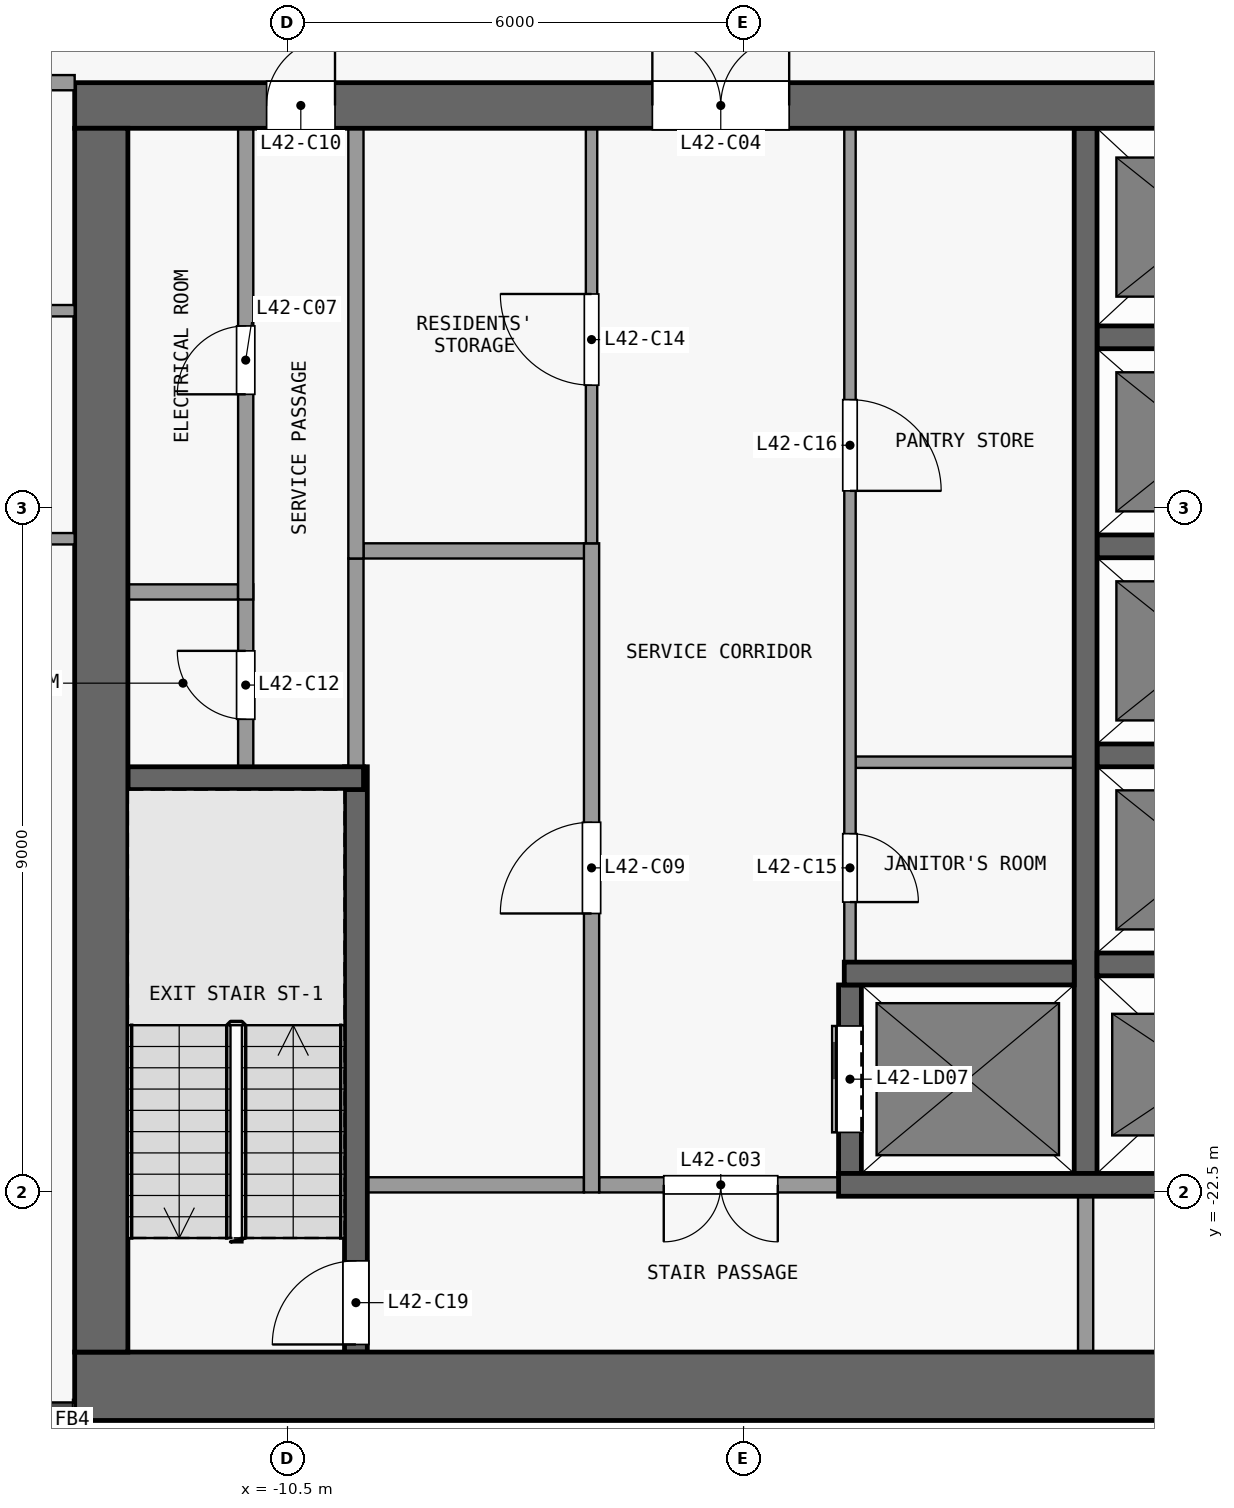
"""IFC4 building model, lengths in metres.
Left out: names, types, materials, properties, quantities, classifications, styles, units other than length and angle.
Written with IfcOpenShell. Run it as: python <this file> out.ifc"""

import sys

from ifc_helpers import new_model, si_unit, direction, frame, frame_2d, origin, place, context, subcontext, project, spatial, rectangle, extrude, element, fill, save


model = new_model("IFC4")
c1 = context("Model", 3, precision=1e-05, world=origin(), true_north=direction((0.0, 1.0)))
c2 = subcontext(c1, "Body", "Model", "MODEL_VIEW")
j1 = project(units=[si_unit("LENGTHUNIT", "METRE"), si_unit("PLANEANGLEUNIT", "RADIAN")], contexts=[c1])
p1 = place(None, origin())
s1 = spatial("IfcSite", under=j1, at=p1, CompositionType="ELEMENT")
p2 = place(p1, origin())
s2 = spatial("IfcBuilding", under=s1, at=p2, CompositionType="ELEMENT")
p3 = place(p2, frame((0.0, 0.0, 170.9)))
s3 = spatial("IfcBuildingStorey", under=s2, at=p3, CompositionType="ELEMENT", Elevation=170.9)
p4 = place(p3, frame((-13.3, -25.05, 0.0), z_axis=(0.0, 0.0, 1.0), x_axis=(1.0, 0.0, 0.0)))
e1 = element("IfcWall", 1, at=p4, inside=s3, PredefinedType="SHEAR", context=c2, shape_type="SweptSolid", body=[
    extrude(rectangle(XDim=26.6, YDim=0.9, at=frame_2d((13.3, 0.0))), origin(), (0.0, 0.0, 1.0), 3.3),
])
p5 = place(p3, frame((-13.3, -8.2, 0.0), z_axis=(0.0, 0.0, 1.0), x_axis=(1.0, 0.0, 0.0)))
e2 = element("IfcWall", 2, at=p5, inside=s3, PredefinedType="SHEAR", context=c2, shape_type="SweptSolid", body=[
    extrude(rectangle(XDim=26.6, YDim=0.6, at=frame_2d((13.3, 0.0))), origin(), (0.0, 0.0, 1.0), 3.3),
])
p6 = place(p5, frame((7.6, 0.0, 0.0)))
e3 = element("IfcOpeningElement", 3, at=p6, cuts=e2, PredefinedType="OPENING", context=c2, shape_type="SweptSolid", body=[
    extrude(rectangle(XDim=1.8, YDim=2.1, at=frame_2d((0.9, 1.05))), frame((0.0, 0.31, 0.0), z_axis=(0.0, -1.0, 0.0), x_axis=(1.0, 0.0, 0.0)), (0.0, 0.0, 1.0), 0.62),
])
p7 = place(p5, frame((17.2, 0.0, 0.0)))
e4 = element("IfcOpeningElement", 4, at=p7, cuts=e2, PredefinedType="OPENING", context=c2, shape_type="SweptSolid", body=[
    extrude(rectangle(XDim=1.8, YDim=2.1, at=frame_2d((0.9, 1.05))), frame((0.0, 0.31, 0.0), z_axis=(0.0, -1.0, 0.0), x_axis=(1.0, 0.0, 0.0)), (0.0, 0.0, 1.0), 0.62),
])
p8 = place(p5, frame((2.525, 0.0, 0.0)))
e5 = element("IfcOpeningElement", 5, at=p8, cuts=e2, PredefinedType="OPENING", context=c2, shape_type="SweptSolid", body=[
    extrude(rectangle(XDim=0.9, YDim=2.1, at=frame_2d((0.45, 1.05))), frame((0.0, 0.31, 0.0), z_axis=(0.0, -1.0, 0.0), x_axis=(1.0, 0.0, 0.0)), (0.0, 0.0, 1.0), 0.62),
])
p9 = place(p5, frame((23.175, 0.0, 0.0)))
e6 = element("IfcOpeningElement", 6, at=p9, cuts=e2, PredefinedType="OPENING", context=c2, shape_type="SweptSolid", body=[
    extrude(rectangle(XDim=0.9, YDim=2.1, at=frame_2d((0.45, 1.05))), frame((0.0, 0.31, 0.0), z_axis=(0.0, -1.0, 0.0), x_axis=(1.0, 0.0, 0.0)), (0.0, 0.0, 1.0), 0.62),
])
p10 = place(p3, frame((-12.95, -24.6, 0.0), z_axis=(0.0, 0.0, 1.0), x_axis=(0.0, 1.0, 0.0)))
e7 = element("IfcWall", 7, at=p10, inside=s3, PredefinedType="SHEAR", context=c2, shape_type="SweptSolid", body=[
    extrude(rectangle(XDim=16.1, YDim=0.7, at=frame_2d((8.05, 0.0))), origin(), (0.0, 0.0, 1.0), 3.3),
])
p11 = place(p3, frame((-9.45, -22.4, 0.0), z_axis=(0.0, 0.0, 1.0), x_axis=(1.0, 0.0, 0.0)))
e8 = element("IfcWall", 8, at=p11, inside=s3, PredefinedType="PARTITIONING", context=c2, shape_type="SweptSolid", body=[
    extrude(rectangle(XDim=2.85, YDim=0.2, at=frame_2d((1.425, 0.0))), origin(), (0.0, 0.0, 1.0), 3.3),
])
p12 = place(p3, frame((-3.25, -22.4, 0.0), z_axis=(0.0, 0.0, 1.0), x_axis=(-1.0, 0.0, 0.0)))
e9 = element("IfcWall", 9, at=p12, inside=s3, PredefinedType="PARTITIONING", context=c2, shape_type="SweptSolid", body=[
    extrude(rectangle(XDim=3.15, YDim=0.2, at=frame_2d((1.575, 0.0))), origin(), (0.0, 0.0, 1.0), 3.3),
])
p13 = place(p12, frame((0.8, 0.0, 0.0)))
e10 = element("IfcOpeningElement", 10, at=p13, cuts=e9, PredefinedType="OPENING", context=c2, shape_type="SweptSolid", body=[
    extrude(rectangle(XDim=1.5, YDim=2.1, at=frame_2d((0.75, 1.05))), frame((0.0, 0.11, 0.0), z_axis=(0.0, -1.0, 0.0), x_axis=(1.0, 0.0, 0.0)), (0.0, 0.0, 1.0), 0.22),
])
p14 = place(p3, frame((-3.25, -22.4, 0.0), z_axis=(0.0, 0.0, 1.0), x_axis=(1.0, 0.0, 0.0)))
e11 = element("IfcWall", 11, at=p14, inside=s3, PredefinedType="SHEAR", context=c2, shape_type="SweptSolid", body=[
    extrude(rectangle(XDim=6.2, YDim=0.3, at=frame_2d((3.1, 0.0))), origin(), (0.0, 0.0, 1.0), 3.3),
])
p15 = place(p3, frame((-3.175, -19.62, 0.0), z_axis=(0.0, 0.0, 1.0), x_axis=(1.0, 0.0, 0.0)))
e12 = element("IfcWall", 12, at=p15, inside=s3, PredefinedType="SHEAR", context=c2, shape_type="SweptSolid", body=[
    extrude(rectangle(XDim=3.025, YDim=0.3, at=frame_2d((1.513, 0.0))), origin(), (0.0, 0.0, 1.0), 3.3),
])
p16 = place(p3, frame((0.15, -19.5, 0.0), z_axis=(0.0, 0.0, 1.0), x_axis=(1.0, 0.0, 0.0)))
e13 = element("IfcWall", 13, at=p16, inside=s3, PredefinedType="SHEAR", context=c2, shape_type="SweptSolid", body=[
    extrude(rectangle(XDim=2.8, YDim=0.3, at=frame_2d((1.4, 0.0))), origin(), (0.0, 0.0, 1.0), 3.3),
])
p17 = place(p3, frame((-12.6, -17.05, 0.0), z_axis=(0.0, 0.0, 1.0), x_axis=(1.0, 0.0, 0.0)))
e14 = element("IfcWall", 14, at=p17, inside=s3, PredefinedType="SHEAR", context=c2, shape_type="SweptSolid", body=[
    extrude(rectangle(XDim=3.1, YDim=0.3, at=frame_2d((1.55, 0.0))), origin(), (0.0, 0.0, 1.0), 3.3),
])
p18 = place(p3, frame((-3.025, -16.84, 0.0), z_axis=(0.0, 0.0, 1.0), x_axis=(1.0, 0.0, 0.0)))
e15 = element("IfcWall", 15, at=p18, inside=s3, PredefinedType="PARTITIONING", context=c2, shape_type="SweptSolid", body=[
    extrude(rectangle(XDim=2.875, YDim=0.15, at=frame_2d((1.438, 0.0))), origin(), (0.0, 0.0, 1.0), 3.3),
])
p19 = place(p3, frame((0.15, -16.75, 0.0), z_axis=(0.0, 0.0, 1.0), x_axis=(1.0, 0.0, 0.0)))
e16 = element("IfcWall", 16, at=p19, inside=s3, PredefinedType="SHEAR", context=c2, shape_type="SweptSolid", body=[
    extrude(rectangle(XDim=2.8, YDim=0.3, at=frame_2d((1.4, 0.0))), origin(), (0.0, 0.0, 1.0), 3.3),
])
p20 = place(p3, frame((-12.6, -14.6, 0.0), z_axis=(0.0, 0.0, 1.0), x_axis=(1.0, 0.0, 0.0)))
e17 = element("IfcWall", 17, at=p20, inside=s3, PredefinedType="PARTITIONING", context=c2, shape_type="SweptSolid", body=[
    extrude(rectangle(XDim=1.45, YDim=0.2, at=frame_2d((0.725, 0.0))), origin(), (0.0, 0.0, 1.0), 3.3),
])
p21 = place(p3, frame((-9.5, -14.06, 0.0), z_axis=(0.0, 0.0, 1.0), x_axis=(1.0, 0.0, 0.0)))
e18 = element("IfcWall", 18, at=p21, inside=s3, PredefinedType="PARTITIONING", context=c2, shape_type="SweptSolid", body=[
    extrude(rectangle(XDim=3.075, YDim=0.2, at=frame_2d((1.538, 0.0))), origin(), (0.0, 0.0, 1.0), 3.3),
])
for number, where, z_axis, x_axis in (
    (19, (0.15, -14.0, 0.0), (0.0, 0.0, 1.0), (1.0, 0.0, 0.0)),
    (20, (0.15, -11.25, 0.0), (0.0, 0.0, 1.0), (1.0, 0.0, 0.0)),
):
    element("IfcWall", number, at=place(p3, frame(where, z_axis=z_axis, x_axis=x_axis)), inside=s3, PredefinedType="SHEAR", context=c2, shape_type="SweptSolid", body=[
        extrude(rectangle(XDim=2.8, YDim=0.3, at=frame_2d((1.4, 0.0))), origin(), (0.0, 0.0, 1.0), 3.3),
    ])
p22 = place(p3, frame((-11.05, -16.9, 0.0), z_axis=(0.0, 0.0, 1.0), x_axis=(0.0, 1.0, 0.0)))
e21 = element("IfcWall", 21, at=p22, inside=s3, PredefinedType="PARTITIONING", context=c2, shape_type="SweptSolid", body=[
    extrude(rectangle(XDim=2.4, YDim=0.2, at=frame_2d((1.2, 0.0))), origin(), (0.0, 0.0, 1.0), 3.3),
])
p23 = place(p22, frame((0.625, 0.0, 0.0)))
e22 = element("IfcOpeningElement", 22, at=p23, cuts=e21, PredefinedType="OPENING", context=c2, shape_type="SweptSolid", body=[
    extrude(rectangle(XDim=0.9, YDim=2.1, at=frame_2d((0.45, 1.05))), frame((0.0, 0.11, 0.0), z_axis=(0.0, -1.0, 0.0), x_axis=(1.0, 0.0, 0.0)), (0.0, 0.0, 1.0), 0.22),
])
p24 = place(p3, frame((-11.05, -14.7, 0.0), z_axis=(0.0, 0.0, 1.0), x_axis=(0.0, 1.0, 0.0)))
e23 = element("IfcWall", 23, at=p24, inside=s3, PredefinedType="PARTITIONING", context=c2, shape_type="SweptSolid", body=[
    extrude(rectangle(XDim=6.2, YDim=0.2, at=frame_2d((3.1, 0.0))), origin(), (0.0, 0.0, 1.0), 3.3),
])
p25 = place(p24, frame((2.7, 0.0, 0.0)))
e24 = element("IfcOpeningElement", 24, at=p25, cuts=e23, PredefinedType="OPENING", context=c2, shape_type="SweptSolid", body=[
    extrude(rectangle(XDim=0.9, YDim=2.1, at=frame_2d((0.45, 1.05))), frame((0.0, 0.11, 0.0), z_axis=(0.0, -1.0, 0.0), x_axis=(1.0, 0.0, 0.0)), (0.0, 0.0, 1.0), 0.22),
])
p26 = place(p3, frame((-9.6, -24.6, 0.0), z_axis=(0.0, 0.0, 1.0), x_axis=(0.0, 1.0, 0.0)))
e25 = element("IfcWall", 25, at=p26, inside=s3, PredefinedType="SHEAR", context=c2, shape_type="SweptSolid", body=[
    extrude(rectangle(XDim=7.7, YDim=0.3, at=frame_2d((3.85, 0.0))), origin(), (0.0, 0.0, 1.0), 3.3),
])
p27 = place(p26, frame((0.1, 0.0, 0.0)))
e26 = element("IfcOpeningElement", 26, at=p27, cuts=e25, PredefinedType="OPENING", context=c2, shape_type="SweptSolid", body=[
    extrude(rectangle(XDim=1.1, YDim=2.1, at=frame_2d((0.55, 1.05))), frame((0.0, 0.16, 0.0), z_axis=(0.0, -1.0, 0.0), x_axis=(1.0, 0.0, 0.0)), (0.0, 0.0, 1.0), 0.32),
])
p28 = place(p3, frame((-9.6, -16.9, 0.0), z_axis=(0.0, 0.0, 1.0), x_axis=(0.0, 1.0, 0.0)))
e27 = element("IfcWall", 27, at=p28, inside=s3, PredefinedType="PARTITIONING", context=c2, shape_type="SweptSolid", body=[
    extrude(rectangle(XDim=2.74, YDim=0.2, at=frame_2d((1.37, 0.0))), origin(), (0.0, 0.0, 1.0), 3.3),
])
p29 = place(p3, frame((-9.6, -14.16, 0.0), z_axis=(0.0, 0.0, 1.0), x_axis=(0.0, 1.0, 0.0)))
e28 = element("IfcWall", 28, at=p29, inside=s3, PredefinedType="PARTITIONING", context=c2, shape_type="SweptSolid", body=[
    extrude(rectangle(XDim=5.66, YDim=0.2, at=frame_2d((2.83, 0.0))), origin(), (0.0, 0.0, 1.0), 3.3),
])
p30 = place(p3, frame((-6.5, -22.5, 0.0), z_axis=(0.0, 0.0, 1.0), x_axis=(0.0, 1.0, 0.0)))
e29 = element("IfcWall", 29, at=p30, inside=s3, PredefinedType="PARTITIONING", context=c2, shape_type="SweptSolid", body=[
    extrude(rectangle(XDim=8.54, YDim=0.2, at=frame_2d((4.27, 0.0))), origin(), (0.0, 0.0, 1.0), 3.3),
])
p31 = place(p30, frame((3.67, 0.0, 0.0)))
e30 = element("IfcOpeningElement", 30, at=p31, cuts=e29, PredefinedType="OPENING", context=c2, shape_type="SweptSolid", body=[
    extrude(rectangle(XDim=1.2, YDim=2.1, at=frame_2d((0.6, 1.05))), frame((0.0, 0.11, 0.0), z_axis=(0.0, -1.0, 0.0), x_axis=(1.0, 0.0, 0.0)), (0.0, 0.0, 1.0), 0.22),
])
p32 = place(p3, frame((-6.5, -13.96, 0.0), z_axis=(0.0, 0.0, 1.0), x_axis=(0.0, 1.0, 0.0)))
e31 = element("IfcWall", 31, at=p32, inside=s3, PredefinedType="PARTITIONING", context=c2, shape_type="SweptSolid", body=[
    extrude(rectangle(XDim=5.46, YDim=0.15, at=frame_2d((2.73, 0.0))), origin(), (0.0, 0.0, 1.0), 3.3),
])
p33 = place(p32, frame((2.08, 0.0, 0.0)))
e32 = element("IfcOpeningElement", 32, at=p33, cuts=e31, PredefinedType="OPENING", context=c2, shape_type="SweptSolid", body=[
    extrude(rectangle(XDim=1.2, YDim=2.1, at=frame_2d((0.6, 1.05))), frame((0.0, 0.085, 0.0), z_axis=(0.0, -1.0, 0.0), x_axis=(1.0, 0.0, 0.0)), (0.0, 0.0, 1.0), 0.17),
])
p34 = place(p3, frame((-3.1, -22.25, 0.0), z_axis=(0.0, 0.0, 1.0), x_axis=(0.0, 1.0, 0.0)))
e33 = element("IfcWall", 33, at=p34, inside=s3, PredefinedType="SHEAR", context=c2, shape_type="SweptSolid", body=[
    extrude(rectangle(XDim=2.48, YDim=0.3, at=frame_2d((1.24, 0.0))), origin(), (0.0, 0.0, 1.0), 3.3),
])
p35 = place(p34, frame((0.54, 0.0, 0.0)))
e34 = element("IfcOpeningElement", 34, at=p35, cuts=e33, PredefinedType="OPENING", context=c2, shape_type="SweptSolid", body=[
    extrude(rectangle(XDim=1.4, YDim=2.1, at=frame_2d((0.7, 1.05))), frame((0.0, 0.16, 0.0), z_axis=(0.0, -1.0, 0.0), x_axis=(1.0, 0.0, 0.0)), (0.0, 0.0, 1.0), 0.32),
])
p36 = place(p3, frame((-3.1, -8.5, 0.0), z_axis=(0.0, 0.0, 1.0), x_axis=(0.0, -1.0, 0.0)))
e35 = element("IfcWall", 35, at=p36, inside=s3, PredefinedType="PARTITIONING", context=c2, shape_type="SweptSolid", body=[
    extrude(rectangle(XDim=10.97, YDim=0.15, at=frame_2d((5.485, 0.0))), origin(), (0.0, 0.0, 1.0), 3.3),
])
p37 = place(p36, frame((9.28, 0.0, 0.0)))
e36 = element("IfcOpeningElement", 36, at=p37, cuts=e35, PredefinedType="OPENING", context=c2, shape_type="SweptSolid", body=[
    extrude(rectangle(XDim=0.9, YDim=2.1, at=frame_2d((0.45, 1.05))), frame((0.0, 0.085, 0.0), z_axis=(0.0, -1.0, 0.0), x_axis=(1.0, 0.0, 0.0)), (0.0, 0.0, 1.0), 0.17),
])
p38 = place(p36, frame((3.57, 0.0, 0.0)))
e37 = element("IfcOpeningElement", 37, at=p38, cuts=e35, PredefinedType="OPENING", context=c2, shape_type="SweptSolid", body=[
    extrude(rectangle(XDim=1.2, YDim=2.1, at=frame_2d((0.6, 1.05))), frame((0.0, 0.085, 0.0), z_axis=(0.0, -1.0, 0.0), x_axis=(1.0, 0.0, 0.0)), (0.0, 0.0, 1.0), 0.17),
])
p39 = place(p3, frame((0.0, -24.6, 0.0), z_axis=(0.0, 0.0, 1.0), x_axis=(0.0, 1.0, 0.0)))
e38 = element("IfcWall", 38, at=p39, inside=s3, PredefinedType="PARTITIONING", context=c2, shape_type="SweptSolid", body=[
    extrude(rectangle(XDim=2.05, YDim=0.2, at=frame_2d((1.025, 0.0))), origin(), (0.0, 0.0, 1.0), 3.3),
])
p40 = place(p3, frame((0.0, -22.25, 0.0), z_axis=(0.0, 0.0, 1.0), x_axis=(0.0, 1.0, 0.0)))
e39 = element("IfcWall", 39, at=p40, inside=s3, PredefinedType="SHEAR", context=c2, shape_type="SweptSolid", body=[
    extrude(rectangle(XDim=13.75, YDim=0.3, at=frame_2d((6.875, 0.0))), origin(), (0.0, 0.0, 1.0), 3.3),
])
p41 = place(p3, frame((-19.262, -13.9, 0.0), z_axis=(0.0, 0.0, 1.0), x_axis=(1.0, 0.0, 0.0)))
e40 = element("IfcWall", 40, at=p41, inside=s3, PredefinedType="PARTITIONING", context=c2, shape_type="SweptSolid", body=[
    extrude(rectangle(XDim=5.962, YDim=0.15, at=frame_2d((2.981, 0.0))), origin(), (0.0, 0.0, 1.0), 3.3),
])
p42 = place(p41, frame((0.512, 0.0, 0.0)))
e41 = element("IfcOpeningElement", 41, at=p42, cuts=e40, PredefinedType="OPENING", context=c2, shape_type="SweptSolid", body=[
    extrude(rectangle(XDim=0.9, YDim=2.1, at=frame_2d((0.45, 1.05))), frame((0.0, 0.085, 0.0), z_axis=(0.0, -1.0, 0.0), x_axis=(1.0, 0.0, 0.0)), (0.0, 0.0, 1.0), 0.17),
])
p43 = place(p3, frame((-19.262, -10.9, 0.0), z_axis=(0.0, 0.0, 1.0), x_axis=(1.0, 0.0, 0.0)))
e42 = element("IfcWall", 42, at=p43, inside=s3, PredefinedType="PARTITIONING", context=c2, shape_type="SweptSolid", body=[
    extrude(rectangle(XDim=5.962, YDim=0.15, at=frame_2d((2.981, 0.0))), origin(), (0.0, 0.0, 1.0), 3.3),
])
p44 = place(p43, frame((1.012, 0.0, 0.0)))
e43 = element("IfcOpeningElement", 43, at=p44, cuts=e42, PredefinedType="OPENING", context=c2, shape_type="SweptSolid", body=[
    extrude(rectangle(XDim=0.9, YDim=2.1, at=frame_2d((0.45, 1.05))), frame((0.0, 0.085, 0.0), z_axis=(0.0, -1.0, 0.0), x_axis=(1.0, 0.0, 0.0)), (0.0, 0.0, 1.0), 0.17),
])
p45 = place(p43, frame((3.963, 0.0, 0.0)))
e44 = element("IfcOpeningElement", 44, at=p45, cuts=e42, PredefinedType="OPENING", context=c2, shape_type="SweptSolid", body=[
    extrude(rectangle(XDim=0.9, YDim=2.1, at=frame_2d((0.45, 1.05))), frame((0.0, 0.085, 0.0), z_axis=(0.0, -1.0, 0.0), x_axis=(1.0, 0.0, 0.0)), (0.0, 0.0, 1.0), 0.17),
])
p46 = place(p3, frame((-19.262, -7.9, 0.0), z_axis=(0.0, 0.0, 1.0), x_axis=(1.0, 0.0, 0.0)))
e45 = element("IfcWall", 45, at=p46, inside=s3, PredefinedType="PARTITIONING", context=c2, shape_type="SweptSolid", body=[
    extrude(rectangle(XDim=5.962, YDim=0.2, at=frame_2d((2.981, 0.0))), origin(), (0.0, 0.0, 1.0), 3.3),
])
p47 = place(p46, frame((2.412, 0.0, 0.0)))
e46 = element("IfcOpeningElement", 46, at=p47, cuts=e45, PredefinedType="OPENING", context=c2, shape_type="SweptSolid", body=[
    extrude(rectangle(XDim=1.0, YDim=2.1, at=frame_2d((0.5, 1.05))), frame((0.0, 0.11, 0.0), z_axis=(0.0, -1.0, 0.0), x_axis=(1.0, 0.0, 0.0)), (0.0, 0.0, 1.0), 0.22),
])
p48 = place(p35, origin())
e47 = element("IfcDoor", 47, at=p48, inside=s3, OperationType="DOUBLE_DOOR_SLIDING", PredefinedType="DOOR", context=c2, shape_type="SweptSolid", body=[
    extrude(rectangle(XDim=1.4, YDim=2.1, at=frame_2d((0.7, 1.05))), frame((0.0, 0.025, 0.0), z_axis=(0.0, -1.0, 0.0), x_axis=(1.0, 0.0, 0.0)), (0.0, 0.0, 1.0), 0.05),
])
fill(e34, e47)
p49 = place(p13, origin())
e48 = element("IfcDoor", 48, at=p49, inside=s3, OperationType="DOUBLE_DOOR_SINGLE_SWING", PredefinedType="DOOR", context=c2, shape_type="SweptSolid", body=[
    extrude(rectangle(XDim=1.5, YDim=2.1, at=frame_2d((0.75, 1.05))), frame((0.0, 0.025, 0.0), z_axis=(0.0, -1.0, 0.0), x_axis=(1.0, 0.0, 0.0)), (0.0, 0.0, 1.0), 0.05),
])
fill(e10, e48)
p50 = place(p6, origin())
e49 = element("IfcDoor", 49, at=p50, inside=s3, OperationType="DOUBLE_DOOR_SINGLE_SWING", PredefinedType="DOOR", context=c2, shape_type="SweptSolid", body=[
    extrude(rectangle(XDim=1.8, YDim=2.1, at=frame_2d((0.9, 1.05))), frame((0.0, 0.025, 0.0), z_axis=(0.0, -1.0, 0.0), x_axis=(1.0, 0.0, 0.0)), (0.0, 0.0, 1.0), 0.05),
])
fill(e3, e49)
p51 = place(p25, origin())
e50 = element("IfcDoor", 50, at=p51, inside=s3, OperationType="SINGLE_SWING_LEFT", PredefinedType="DOOR", context=c2, shape_type="SweptSolid", body=[
    extrude(rectangle(XDim=0.9, YDim=2.1, at=frame_2d((0.45, 1.05))), frame((0.0, 0.025, 0.0), z_axis=(0.0, -1.0, 0.0), x_axis=(1.0, 0.0, 0.0)), (0.0, 0.0, 1.0), 0.05),
])
fill(e24, e50)
p52 = place(p31, origin())
e51 = element("IfcDoor", 51, at=p52, inside=s3, OperationType="SINGLE_SWING_LEFT", PredefinedType="DOOR", context=c2, shape_type="SweptSolid", body=[
    extrude(rectangle(XDim=1.2, YDim=2.1, at=frame_2d((0.6, 1.05))), frame((0.0, 0.025, 0.0), z_axis=(0.0, -1.0, 0.0), x_axis=(1.0, 0.0, 0.0)), (0.0, 0.0, 1.0), 0.05),
])
fill(e30, e51)
p53 = place(p8, origin())
e52 = element("IfcDoor", 52, at=p53, inside=s3, OperationType="SINGLE_SWING_RIGHT", PredefinedType="DOOR", context=c2, shape_type="SweptSolid", body=[
    extrude(rectangle(XDim=0.9, YDim=2.1, at=frame_2d((0.45, 1.05))), frame((0.0, 0.025, 0.0), z_axis=(0.0, -1.0, 0.0), x_axis=(1.0, 0.0, 0.0)), (0.0, 0.0, 1.0), 0.05),
])
fill(e5, e52)
p54 = place(p23, origin())
e53 = element("IfcDoor", 53, at=p54, inside=s3, OperationType="SINGLE_SWING_RIGHT", PredefinedType="DOOR", context=c2, shape_type="SweptSolid", body=[
    extrude(rectangle(XDim=0.9, YDim=2.1, at=frame_2d((0.45, 1.05))), frame((0.0, 0.025, 0.0), z_axis=(0.0, -1.0, 0.0), x_axis=(1.0, 0.0, 0.0)), (0.0, 0.0, 1.0), 0.05),
])
fill(e22, e53)
p55 = place(p33, origin())
e54 = element("IfcDoor", 54, at=p55, inside=s3, OperationType="SINGLE_SWING_RIGHT", PredefinedType="DOOR", context=c2, shape_type="SweptSolid", body=[
    extrude(rectangle(XDim=1.2, YDim=2.1, at=frame_2d((0.6, 1.05))), frame((0.0, 0.025, 0.0), z_axis=(0.0, -1.0, 0.0), x_axis=(1.0, 0.0, 0.0)), (0.0, 0.0, 1.0), 0.05),
])
fill(e32, e54)
p56 = place(p37, origin())
e55 = element("IfcDoor", 55, at=p56, inside=s3, OperationType="SINGLE_SWING_RIGHT", PredefinedType="DOOR", context=c2, shape_type="SweptSolid", body=[
    extrude(rectangle(XDim=0.9, YDim=2.1, at=frame_2d((0.45, 1.05))), frame((0.0, 0.025, 0.0), z_axis=(0.0, -1.0, 0.0), x_axis=(1.0, 0.0, 0.0)), (0.0, 0.0, 1.0), 0.05),
])
fill(e36, e55)
p57 = place(p38, origin())
e56 = element("IfcDoor", 56, at=p57, inside=s3, OperationType="SINGLE_SWING_RIGHT", PredefinedType="DOOR", context=c2, shape_type="SweptSolid", body=[
    extrude(rectangle(XDim=1.2, YDim=2.1, at=frame_2d((0.6, 1.05))), frame((0.0, 0.025, 0.0), z_axis=(0.0, -1.0, 0.0), x_axis=(1.0, 0.0, 0.0)), (0.0, 0.0, 1.0), 0.05),
])
fill(e37, e56)
p58 = place(p27, origin())
e57 = element("IfcDoor", 57, at=p58, inside=s3, OperationType="SINGLE_SWING_LEFT", PredefinedType="DOOR", context=c2, shape_type="SweptSolid", body=[
    extrude(rectangle(XDim=1.1, YDim=2.1, at=frame_2d((0.55, 1.05))), frame((0.0, 0.025, 0.0), z_axis=(0.0, -1.0, 0.0), x_axis=(1.0, 0.0, 0.0)), (0.0, 0.0, 1.0), 0.05),
])
fill(e26, e57)
save(model, sys.argv[1])
